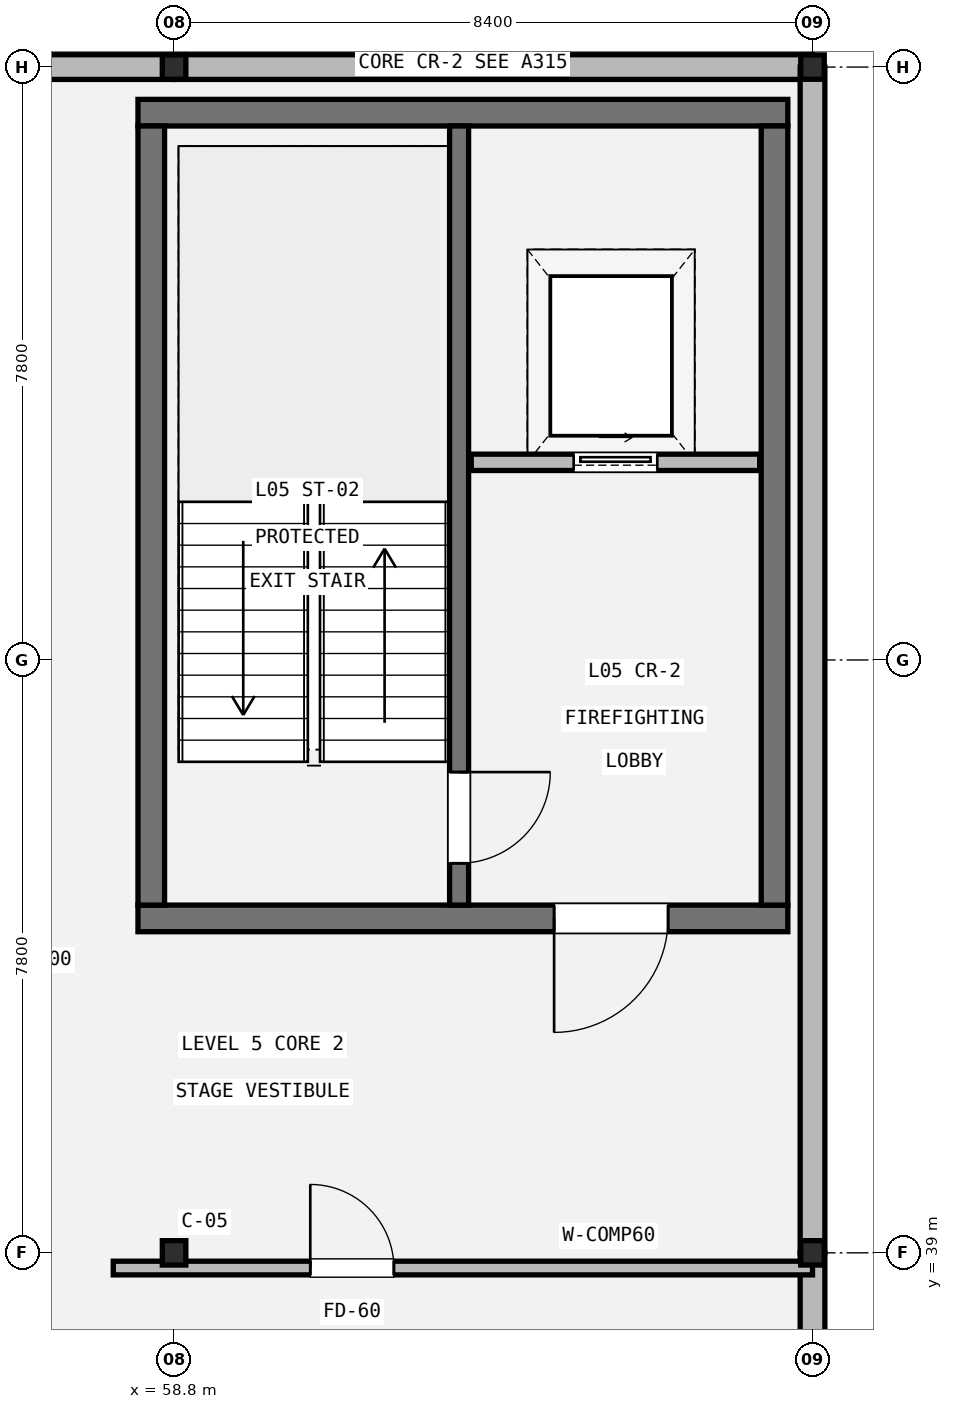
"""IFC4 building model, lengths in metres.
Left out: names, types, materials, properties, quantities, classifications, styles, units other than length and angle.
Written with IfcOpenShell. Run it as: python <this file> out.ifc"""

import sys

from ifc_helpers import new_model, si_unit, direction, frame, frame_2d, origin, origin_2d, place, context, subcontext, project, spatial, rectangle, i_section, extrude, element, fill, save


model = new_model("IFC4")
c1 = context("Model", 3, precision=1e-05, world=origin(), true_north=direction((0.0, 1.0)))
c2 = subcontext(c1, "Body", "Model", "MODEL_VIEW")
j1 = project(units=[si_unit("LENGTHUNIT", "METRE"), si_unit("PLANEANGLEUNIT", "RADIAN")], contexts=[c1])
p1 = place(None, origin())
s1 = spatial("IfcSite", under=j1, at=p1, CompositionType="ELEMENT")
p2 = place(p1, origin())
s2 = spatial("IfcBuilding", under=s1, at=p2, CompositionType="ELEMENT")
p3 = place(p2, frame((0.0, 0.0, 23.4)))
s3 = spatial("IfcBuildingStorey", under=s2, at=p3, CompositionType="ELEMENT", Elevation=23.4)
for number, where, z_axis, x_axis in (
    (1, (58.8, 39.0, 0.0), (0.0, 0.0, 1.0), (1.0, 0.0, 0.0)),
    (2, (58.8, 54.6, 0.0), (0.0, 0.0, 1.0), (1.0, 0.0, 0.0)),
    (3, (67.2, 39.0, 0.0), (0.0, 0.0, 1.0), (1.0, 0.0, 0.0)),
    (4, (67.2, 54.6, 0.0), (0.0, 0.0, 1.0), (1.0, 0.0, 0.0)),
):
    element("IfcColumn", number, at=place(p3, frame(where, z_axis=z_axis, x_axis=x_axis)), inside=s3, PredefinedType="COLUMN", context=c2, shape_type="SweptSolid", body=[
        extrude(i_section(OverallWidth=0.309, OverallDepth=0.321, WebThickness=0.014, FlangeThickness=0.022, FilletRadius=0.015, at=origin_2d()), origin(), (0.0, 0.0, 1.0), 4.2),
    ])
p4 = place(p3, frame((50.4, 54.6, 0.0), z_axis=(0.0, 0.0, 1.0), x_axis=(1.0, 0.0, 0.0)))
e5 = element("IfcWall", 5, at=p4, inside=s3, PredefinedType="STANDARD", context=c2, shape_type="SweptSolid", body=[
    extrude(rectangle(XDim=8.4, YDim=0.325, at=frame_2d((4.2, 0.0))), origin(), (0.0, 0.0, 1.0), 3.408),
])
p5 = place(p3, frame((58.8, 54.6, 0.0), z_axis=(0.0, 0.0, 1.0), x_axis=(1.0, 0.0, 0.0)))
e6 = element("IfcWall", 6, at=p5, inside=s3, PredefinedType="STANDARD", context=c2, shape_type="SweptSolid", body=[
    extrude(rectangle(XDim=8.4, YDim=0.325, at=frame_2d((4.2, 0.0))), origin(), (0.0, 0.0, 1.0), 3.177),
])
p6 = place(p3, frame((67.2, 54.6, 0.0), z_axis=(0.0, 0.0, 1.0), x_axis=(0.0, -1.0, 0.0)))
e7 = element("IfcWall", 7, at=p6, inside=s3, PredefinedType="STANDARD", context=c2, shape_type="SweptSolid", body=[
    extrude(rectangle(XDim=15.6, YDim=0.325, at=frame_2d((7.8, 0.0))), origin(), (0.0, 0.0, 1.0), 3.177),
])
p7 = place(p3, frame((67.2, 39.0, 0.0), z_axis=(0.0, 0.0, 1.0), x_axis=(0.0, -1.0, 0.0)))
e8 = element("IfcWall", 8, at=p7, inside=s3, PredefinedType="STANDARD", context=c2, shape_type="SweptSolid", body=[
    extrude(rectangle(XDim=7.8, YDim=0.325, at=frame_2d((3.9, 0.0))), origin(), (0.0, 0.0, 1.0), 3.177),
])
p8 = place(p3, frame((66.875, 43.4, 0.0), z_axis=(0.0, 0.0, 1.0), x_axis=(-1.0, 0.0, 0.0)))
e9 = element("IfcWall", 9, at=p8, inside=s3, PredefinedType="SHEAR", context=c2, shape_type="SweptSolid", body=[
    extrude(rectangle(XDim=8.55, YDim=0.35, at=frame_2d((4.275, 0.0))), origin(), (0.0, 0.0, 1.0), 3.955),
])
p9 = place(p8, frame((1.575, 0.0, 0.0)))
e10 = element("IfcOpeningElement", 10, at=p9, cuts=e9, PredefinedType="OPENING", context=c2, shape_type="SweptSolid", body=[
    extrude(rectangle(XDim=1.5, YDim=2.15, at=frame_2d((0.75, 1.075))), frame((0.0, 0.185, 0.0), z_axis=(0.0, -1.0, 0.0), x_axis=(1.0, 0.0, 0.0)), (0.0, 0.0, 1.0), 0.37),
])
p10 = place(p3, frame((58.325, 54.0, 0.0), z_axis=(0.0, 0.0, 1.0), x_axis=(1.0, 0.0, 0.0)))
e11 = element("IfcWall", 11, at=p10, inside=s3, PredefinedType="SHEAR", context=c2, shape_type="SweptSolid", body=[
    extrude(rectangle(XDim=8.55, YDim=0.35, at=frame_2d((4.275, 0.0))), origin(), (0.0, 0.0, 1.0), 3.955),
])
for number, where, z_axis, x_axis in (
    (12, (58.5, 43.575, 0.0), (0.0, 0.0, 1.0), (0.0, 1.0, 0.0)),
    (13, (66.7, 53.825, 0.0), (0.0, 0.0, 1.0), (0.0, -1.0, 0.0)),
):
    element("IfcWall", number, at=place(p3, frame(where, z_axis=z_axis, x_axis=x_axis)), inside=s3, PredefinedType="SHEAR", context=c2, shape_type="SweptSolid", body=[
        extrude(rectangle(XDim=10.25, YDim=0.35, at=frame_2d((5.125, 0.0))), origin(), (0.0, 0.0, 1.0), 3.955),
    ])
p11 = place(p3, frame((62.55, 53.825, 0.0), z_axis=(0.0, 0.0, 1.0), x_axis=(0.0, -1.0, 0.0)))
e14 = element("IfcWall", 14, at=p11, inside=s3, PredefinedType="SHEAR", context=c2, shape_type="SweptSolid", body=[
    extrude(rectangle(XDim=10.25, YDim=0.25, at=frame_2d((5.125, 0.0))), origin(), (0.0, 0.0, 1.0), 3.955),
])
p12 = place(p11, frame((8.5, 0.0, 0.0)))
e15 = element("IfcOpeningElement", 15, at=p12, cuts=e14, PredefinedType="OPENING", context=c2, shape_type="SweptSolid", body=[
    extrude(rectangle(XDim=1.2, YDim=2.15, at=frame_2d((0.6, 1.075))), frame((0.0, 0.135, 0.0), z_axis=(0.0, -1.0, 0.0), x_axis=(1.0, 0.0, 0.0)), (0.0, 0.0, 1.0), 0.27),
])
p13 = place(p3, frame((62.71, 49.4, 0.0), z_axis=(0.0, 0.0, 1.0), x_axis=(1.0, 0.0, 0.0)))
e16 = element("IfcWall", 16, at=p13, inside=s3, PredefinedType="STANDARD", context=c2, shape_type="SweptSolid", body=[
    extrude(rectangle(XDim=3.795, YDim=0.215, at=frame_2d((1.897, 0.0))), origin(), (0.0, 0.0, 1.0), 3.947),
])
p14 = place(p13, frame((1.347, 0.0, 0.0)))
e17 = element("IfcOpeningElement", 17, at=p14, cuts=e16, PredefinedType="OPENING", context=c2, shape_type="SweptSolid", body=[
    extrude(rectangle(XDim=1.1, YDim=2.2, at=frame_2d((0.55, 1.1))), frame((0.0, 0.117, 0.0), z_axis=(0.0, -1.0, 0.0), x_axis=(1.0, 0.0, 0.0)), (0.0, 0.0, 1.0), 0.235),
])
p15 = place(p3, frame((58.0, 38.8, 0.0), z_axis=(0.0, 0.0, 1.0), x_axis=(1.0, 0.0, 0.0)))
e18 = element("IfcWall", 18, at=p15, inside=s3, PredefinedType="STANDARD", context=c2, shape_type="SweptSolid", body=[
    extrude(rectangle(XDim=9.2, YDim=0.18, at=frame_2d((4.6, 0.0))), origin(), (0.0, 0.0, 1.0), 3.096),
])
p16 = place(p15, frame((2.592, 0.0, 0.0)))
e19 = element("IfcOpeningElement", 19, at=p16, cuts=e18, PredefinedType="OPENING", context=c2, shape_type="SweptSolid", body=[
    extrude(rectangle(XDim=1.1, YDim=2.15, at=frame_2d((0.55, 1.075))), frame((0.0, 0.1, 0.0), z_axis=(0.0, -1.0, 0.0), x_axis=(1.0, 0.0, 0.0)), (0.0, 0.0, 1.0), 0.2),
])
p17 = place(p12, origin())
e20 = element("IfcDoor", 20, at=p17, inside=s3, OperationType="SINGLE_SWING_LEFT", PredefinedType="DOOR", context=c2, shape_type="SweptSolid", body=[
    extrude(rectangle(XDim=1.2, YDim=2.15, at=frame_2d((0.6, 1.075))), frame((0.0, 0.025, 0.0), z_axis=(0.0, -1.0, 0.0), x_axis=(1.0, 0.0, 0.0)), (0.0, 0.0, 1.0), 0.05),
])
fill(e15, e20)
p18 = place(p9, origin())
e21 = element("IfcDoor", 21, at=p18, inside=s3, OperationType="SINGLE_SWING_RIGHT", PredefinedType="DOOR", context=c2, shape_type="SweptSolid", body=[
    extrude(rectangle(XDim=1.5, YDim=2.15, at=frame_2d((0.75, 1.075))), frame((0.0, 0.025, 0.0), z_axis=(0.0, -1.0, 0.0), x_axis=(1.0, 0.0, 0.0)), (0.0, 0.0, 1.0), 0.05),
])
fill(e10, e21)
p19 = place(p14, origin())
e22 = element("IfcDoor", 22, at=p19, inside=s3, OperationType="SLIDING_TO_RIGHT", PredefinedType="DOOR", context=c2, shape_type="SweptSolid", body=[
    extrude(rectangle(XDim=1.1, YDim=2.2, at=frame_2d((0.55, 1.1))), frame((0.0, 0.025, 0.0), z_axis=(0.0, -1.0, 0.0), x_axis=(1.0, 0.0, 0.0)), (0.0, 0.0, 1.0), 0.05),
])
fill(e17, e22)
p20 = place(p16, origin())
e23 = element("IfcDoor", 23, at=p20, inside=s3, OperationType="SINGLE_SWING_LEFT", PredefinedType="DOOR", context=c2, shape_type="SweptSolid", body=[
    extrude(rectangle(XDim=1.1, YDim=2.15, at=frame_2d((0.55, 1.075))), frame((0.0, 0.025, 0.0), z_axis=(0.0, -1.0, 0.0), x_axis=(1.0, 0.0, 0.0)), (0.0, 0.0, 1.0), 0.05),
])
fill(e19, e23)
save(model, sys.argv[1])
